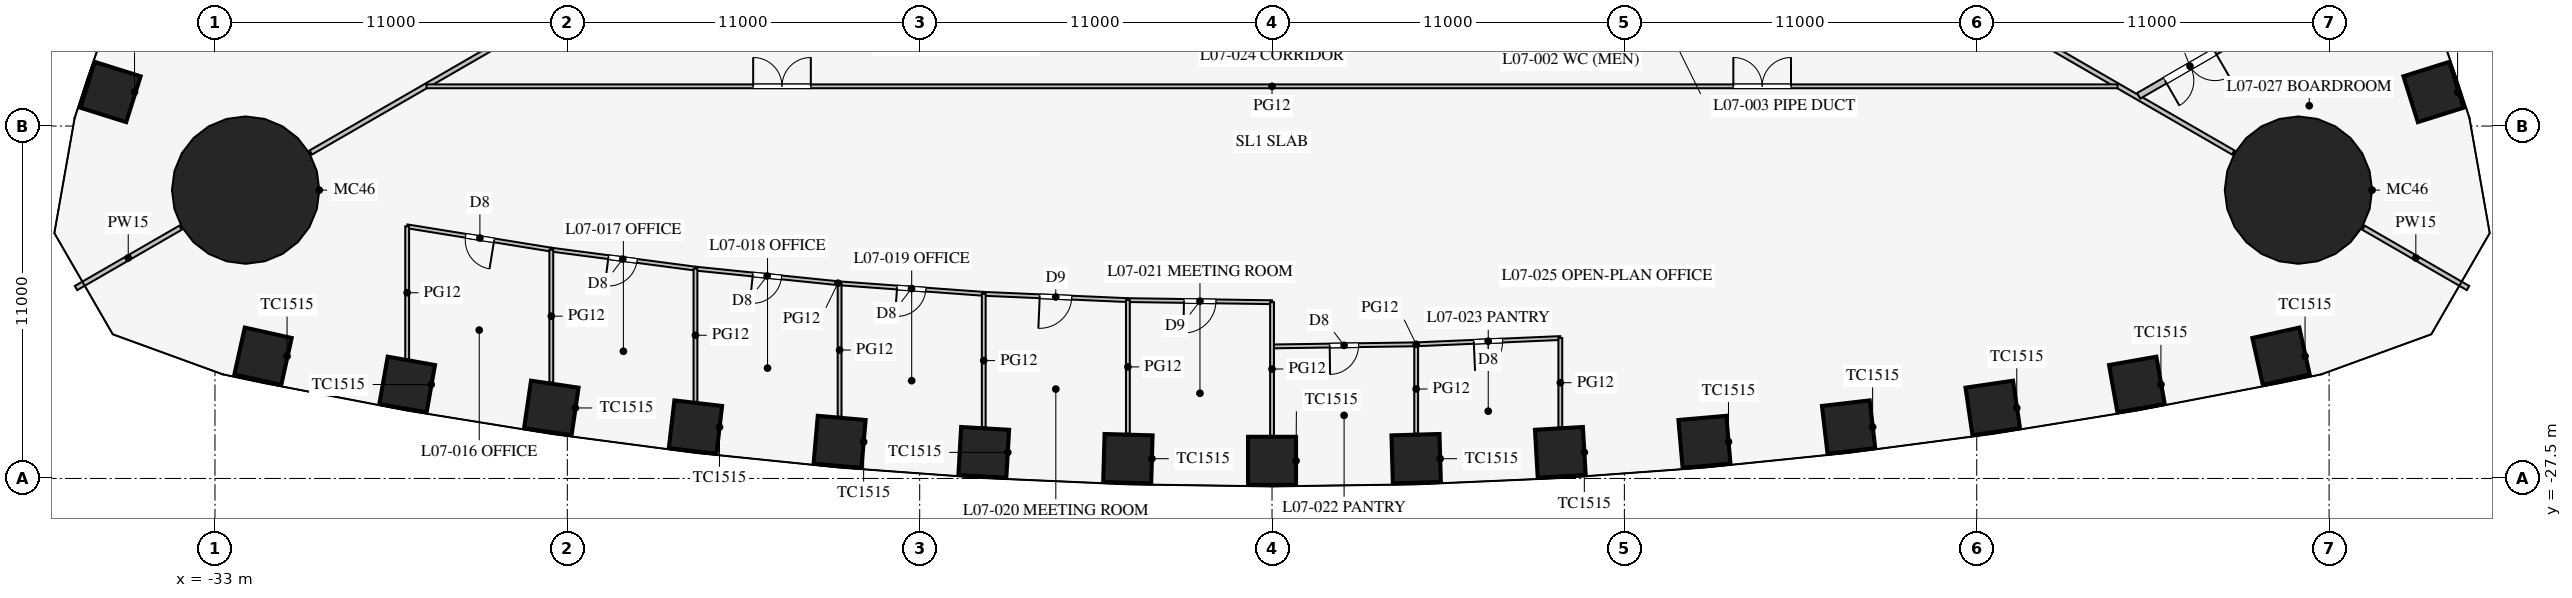
"""IFC4 building model, lengths in metres.
Left out: names, types, materials, properties, quantities, classifications, styles, units other than length and angle.
Written with IfcOpenShell. Run it as: python <this file> out.ifc"""

import sys

from ifc_helpers import new_model, si_unit, direction, frame, frame_2d, origin, origin_2d, place, context, subcontext, project, spatial, rectangle, circle, extrude, element, fill, save


model = new_model("IFC4")
c1 = context("Model", 3, precision=1e-05, world=origin(), true_north=direction((0.0, 1.0)))
c2 = subcontext(c1, "Body", "Model", "MODEL_VIEW")
j1 = project(units=[si_unit("LENGTHUNIT", "METRE"), si_unit("PLANEANGLEUNIT", "RADIAN")], contexts=[c1])
p1 = place(None, origin())
s1 = spatial("IfcSite", under=j1, at=p1, CompositionType="ELEMENT")
p2 = place(p1, origin())
s2 = spatial("IfcBuilding", under=s1, at=p2, CompositionType="ELEMENT")
p3 = place(p2, frame((0.0, 0.0, 33.3)))
s3 = spatial("IfcBuildingStorey", under=s2, at=p3, CompositionType="ELEMENT", Elevation=33.3)
for number, where, z_axis, x_axis in (
    (1, (-31.5, -23.685, 0.0), (0.0, 0.0, 1.0), (0.976, -0.217, 0.0)),
    (2, (-27.0, -24.568, 0.0), (0.0, 0.0, 1.0), (0.985, -0.174, 0.0)),
    (3, (-22.5, -25.299, 0.0), (0.0, 0.0, 1.0), (0.989, -0.145, 0.0)),
    (4, (-18.0, -25.895, 0.0), (0.0, 0.0, 1.0), (0.993, -0.116, 0.0)),
    (5, (-13.5, -26.357, 0.0), (0.0, 0.0, 1.0), (0.996, -0.087, 0.0)),
    (6, (-9.0, -26.686, 0.0), (0.0, 0.0, 1.0), (0.998, -0.058, 0.0)),
    (7, (-4.5, -26.883, 0.0), (0.0, 0.0, 1.0), (1.0, -0.029, 0.0)),
    (8, (0.0, -26.949, 0.0), (0.0, 0.0, 1.0), (1.0, 0.0, 0.0)),
    (9, (4.5, -26.883, 0.0), (0.0, 0.0, 1.0), (1.0, 0.029, 0.0)),
    (10, (9.0, -26.686, 0.0), (0.0, 0.0, 1.0), (0.998, 0.058, 0.0)),
    (11, (13.5, -26.357, 0.0), (0.0, 0.0, 1.0), (0.996, 0.087, 0.0)),
    (12, (18.0, -25.895, 0.0), (0.0, 0.0, 1.0), (0.993, 0.116, 0.0)),
    (13, (22.5, -25.299, 0.0), (0.0, 0.0, 1.0), (0.989, 0.145, 0.0)),
    (14, (27.0, -24.568, 0.0), (0.0, 0.0, 1.0), (0.985, 0.174, 0.0)),
    (15, (31.5, -23.685, 0.0), (0.0, 0.0, 1.0), (0.976, 0.217, 0.0)),
    (16, (36.262, -15.438, 0.0), (0.0, 0.0, 1.0), (-0.3, 0.954, 0.0)),
    (17, (-36.262, -15.438, 0.0), (0.0, 0.0, 1.0), (-0.3, -0.954, 0.0)),
):
    element("IfcColumn", number, at=place(p3, frame(where, z_axis=z_axis, x_axis=x_axis)), inside=s3, PredefinedType="COLUMN", context=c2, shape_type="SweptSolid", body=[
        extrude(rectangle(XDim=1.5, YDim=1.5, at=origin_2d()), origin(), (0.0, 0.0, 1.0), 4.2),
    ])
for number, where, z_axis, x_axis in (
    (18, (32.043, -18.5, 0.0), (0.0, 0.0, 1.0), (1.0, 0.0, 0.0)),
    (19, (-32.043, -18.5, 0.0), (0.0, 0.0, 1.0), (1.0, 0.0, 0.0)),
):
    element("IfcColumn", number, at=place(p3, frame(where, z_axis=z_axis, x_axis=x_axis)), inside=s3, PredefinedType="COLUMN", context=c2, shape_type="SweptSolid", body=[
        extrude(circle(Radius=2.3, at=origin_2d()), origin(), (0.0, 0.0, 1.0), 4.2),
    ])
p4 = place(p3, frame((14.203, -8.2, 0.0), z_axis=(0.0, 0.0, 1.0), x_axis=(0.866024965723, -0.500000758745, 0.0)))
e20 = element("IfcWall", 20, at=p4, inside=s3, PredefinedType="PARTITIONING", context=c2, shape_type="SweptSolid", body=[
    extrude(rectangle(XDim=18.25, YDim=0.15, at=frame_2d((9.125, 0.0))), origin(), (0.0, 0.0, 1.0), 2.3),
])
p5 = place(p3, frame((34.078, -19.675, 0.0), z_axis=(0.0, 0.0, 1.0), x_axis=(0.866019247219, -0.500010663332, 0.0)))
e21 = element("IfcWall", 21, at=p5, inside=s3, PredefinedType="PARTITIONING", context=c2, shape_type="SweptSolid", body=[
    extrude(rectangle(XDim=3.764, YDim=0.15, at=frame_2d((1.882, 0.0))), origin(), (0.0, 0.0, 1.0), 2.3),
])
p6 = place(p3, frame((-14.203, -8.2, 0.0), z_axis=(0.0, 0.0, 1.0), x_axis=(-0.866024965723, -0.500000758745, 0.0)))
e22 = element("IfcWall", 22, at=p6, inside=s3, PredefinedType="PARTITIONING", context=c2, shape_type="SweptSolid", body=[
    extrude(rectangle(XDim=18.25, YDim=0.15, at=frame_2d((9.125, 0.0))), origin(), (0.0, 0.0, 1.0), 2.3),
])
p7 = place(p3, frame((-34.078, -19.675, 0.0), z_axis=(0.0, 0.0, 1.0), x_axis=(-0.866019247219, -0.500010663332, 0.0)))
e23 = element("IfcWall", 23, at=p7, inside=s3, PredefinedType="PARTITIONING", context=c2, shape_type="SweptSolid", body=[
    extrude(rectangle(XDim=3.764, YDim=0.15, at=frame_2d((1.882, 0.0))), origin(), (0.0, 0.0, 1.0), 2.3),
])
p8 = place(p3, frame((-26.398, -15.26, 0.0), z_axis=(0.0, 0.0, 1.0), x_axis=(1.0, 0.0, 0.0)))
e24 = element("IfcWall", 24, at=p8, inside=s3, PredefinedType="PARTITIONING", context=c2, shape_type="SweptSolid", body=[
    extrude(rectangle(XDim=52.796, YDim=0.12, at=frame_2d((26.398, 0.0))), origin(), (0.0, 0.0, 1.0), 2.9),
])
p9 = place(p8, frame((10.2, 0.0, 0.15)))
e25 = element("IfcOpeningElement", 25, at=p9, cuts=e24, PredefinedType="OPENING", context=c2, shape_type="SweptSolid", body=[
    extrude(rectangle(XDim=1.8, YDim=2.1, at=frame_2d((0.9, 1.05))), frame((0.0, 0.07, 0.0), z_axis=(0.0, -1.0, 0.0), x_axis=(1.0, 0.0, 0.0)), (0.0, 0.0, 1.0), 0.14),
])
p10 = place(p8, frame((40.8, 0.0, 0.15)))
e26 = element("IfcOpeningElement", 26, at=p10, cuts=e24, PredefinedType="OPENING", context=c2, shape_type="SweptSolid", body=[
    extrude(rectangle(XDim=1.8, YDim=2.1, at=frame_2d((0.9, 1.05))), frame((0.0, 0.07, 0.0), z_axis=(0.0, -1.0, 0.0), x_axis=(1.0, 0.0, 0.0)), (0.0, 0.0, 1.0), 0.14),
])
p11 = place(p3, frame((0.0, -23.379, 0.0), z_axis=(0.0, 0.0, 1.0), x_axis=(0.999895099088, 0.014484157523, 0.0)))
e27 = element("IfcWall", 27, at=p11, inside=s3, PredefinedType="PARTITIONING", context=c2, shape_type="SweptSolid", body=[
    extrude(rectangle(XDim=4.5, YDim=0.12, at=frame_2d((2.25, 0.0))), origin(), (0.0, 0.0, 1.0), 2.9),
])
p12 = place(p11, frame((1.8, 0.0, 0.15)))
e28 = element("IfcOpeningElement", 28, at=p12, cuts=e27, PredefinedType="OPENING", context=c2, shape_type="SweptSolid", body=[
    extrude(rectangle(XDim=0.9, YDim=2.1, at=frame_2d((0.45, 1.05))), frame((0.0, 0.07, 0.0), z_axis=(0.0, -1.0, 0.0), x_axis=(1.0, 0.0, 0.0)), (0.0, 0.0, 1.0), 0.14),
])
p13 = place(p3, frame((4.5, -23.313, 0.0), z_axis=(0.0, 0.0, 1.0), x_axis=(0.999052370647, 0.043524254212, 0.0)))
e29 = element("IfcWall", 29, at=p13, inside=s3, PredefinedType="PARTITIONING", context=c2, shape_type="SweptSolid", body=[
    extrude(rectangle(XDim=4.504, YDim=0.12, at=frame_2d((2.252, 0.0))), origin(), (0.0, 0.0, 1.0), 2.9),
])
p14 = place(p13, frame((1.8, 0.0, 0.15)))
e30 = element("IfcOpeningElement", 30, at=p14, cuts=e29, PredefinedType="OPENING", context=c2, shape_type="SweptSolid", body=[
    extrude(rectangle(XDim=0.9, YDim=2.1, at=frame_2d((0.45, 1.05))), frame((0.0, 0.07, 0.0), z_axis=(0.0, -1.0, 0.0), x_axis=(1.0, 0.0, 0.0)), (0.0, 0.0, 1.0), 0.14),
])
p15 = place(p3, frame((-13.5, -21.41, 0.0), z_axis=(0.0, 0.0, 1.0), x_axis=(0.997363894896, -0.072562119306, 0.0)))
e31 = element("IfcWall", 31, at=p15, inside=s3, PredefinedType="PARTITIONING", context=c2, shape_type="SweptSolid", body=[
    extrude(rectangle(XDim=4.512, YDim=0.12, at=frame_2d((2.256, 0.0))), origin(), (0.0, 0.0, 1.0), 2.9),
])
p16 = place(p15, frame((1.8, 0.0, 0.15)))
e32 = element("IfcOpeningElement", 32, at=p16, cuts=e31, PredefinedType="OPENING", context=c2, shape_type="SweptSolid", body=[
    extrude(rectangle(XDim=0.9, YDim=2.1, at=frame_2d((0.45, 1.05))), frame((0.0, 0.07, 0.0), z_axis=(0.0, -1.0, 0.0), x_axis=(1.0, 0.0, 0.0)), (0.0, 0.0, 1.0), 0.14),
])
p17 = place(p3, frame((-18.0, -20.951, 0.0), z_axis=(0.0, 0.0, 1.0), x_axis=(0.994833141332, -0.101523499286, 0.0)))
e33 = element("IfcWall", 33, at=p17, inside=s3, PredefinedType="PARTITIONING", context=c2, shape_type="SweptSolid", body=[
    extrude(rectangle(XDim=4.523, YDim=0.12, at=frame_2d((2.262, 0.0))), origin(), (0.0, 0.0, 1.0), 2.9),
])
p18 = place(p17, frame((1.8, 0.0, 0.15)))
e34 = element("IfcOpeningElement", 34, at=p18, cuts=e33, PredefinedType="OPENING", context=c2, shape_type="SweptSolid", body=[
    extrude(rectangle(XDim=0.9, YDim=2.1, at=frame_2d((0.45, 1.05))), frame((0.0, 0.07, 0.0), z_axis=(0.0, -1.0, 0.0), x_axis=(1.0, 0.0, 0.0)), (0.0, 0.0, 1.0), 0.14),
])
p19 = place(p3, frame((-22.5, -20.358, 0.0), z_axis=(0.0, 0.0, 1.0), x_axis=(0.991435244698, -0.130599217346, 0.0)))
e35 = element("IfcWall", 35, at=p19, inside=s3, PredefinedType="PARTITIONING", context=c2, shape_type="SweptSolid", body=[
    extrude(rectangle(XDim=4.539, YDim=0.12, at=frame_2d((2.27, 0.0))), origin(), (0.0, 0.0, 1.0), 2.9),
])
p20 = place(p19, frame((1.8, 0.0, 0.15)))
e36 = element("IfcOpeningElement", 36, at=p20, cuts=e35, PredefinedType="OPENING", context=c2, shape_type="SweptSolid", body=[
    extrude(rectangle(XDim=0.9, YDim=2.1, at=frame_2d((0.45, 1.05))), frame((0.0, 0.07, 0.0), z_axis=(0.0, -1.0, 0.0), x_axis=(1.0, 0.0, 0.0)), (0.0, 0.0, 1.0), 0.14),
])
p21 = place(p3, frame((-27.0, -19.63, 0.0), z_axis=(0.0, 0.0, 1.0), x_axis=(0.987181300889, -0.159602879593, 0.0)))
e37 = element("IfcWall", 37, at=p21, inside=s3, PredefinedType="PARTITIONING", context=c2, shape_type="SweptSolid", body=[
    extrude(rectangle(XDim=4.558, YDim=0.12, at=frame_2d((2.279, 0.0))), origin(), (0.0, 0.0, 1.0), 2.9),
])
p22 = place(p21, frame((1.85, 0.0, 0.15)))
e38 = element("IfcOpeningElement", 38, at=p22, cuts=e37, PredefinedType="OPENING", context=c2, shape_type="SweptSolid", body=[
    extrude(rectangle(XDim=0.9, YDim=2.1, at=frame_2d((0.45, 1.05))), frame((0.0, 0.07, 0.0), z_axis=(0.0, -1.0, 0.0), x_axis=(1.0, 0.0, 0.0)), (0.0, 0.0, 1.0), 0.14),
])
p23 = place(p3, frame((-4.5, -21.933, 0.0), z_axis=(0.0, 0.0, 1.0), x_axis=(0.999894311967, -0.014538393859, 0.0)))
e39 = element("IfcWall", 39, at=p23, inside=s3, PredefinedType="PARTITIONING", context=c2, shape_type="SweptSolid", body=[
    extrude(rectangle(XDim=4.5, YDim=0.12, at=frame_2d((2.25, 0.0))), origin(), (0.0, 0.0, 1.0), 2.9),
])
p24 = place(p23, frame((1.75, 0.0, 0.15)))
e40 = element("IfcOpeningElement", 40, at=p24, cuts=e39, PredefinedType="OPENING", context=c2, shape_type="SweptSolid", body=[
    extrude(rectangle(XDim=1.0, YDim=2.1, at=frame_2d((0.5, 1.05))), frame((0.0, 0.07, 0.0), z_axis=(0.0, -1.0, 0.0), x_axis=(1.0, 0.0, 0.0)), (0.0, 0.0, 1.0), 0.14),
])
p25 = place(p3, frame((-9.0, -21.737, 0.0), z_axis=(0.0, 0.0, 1.0), x_axis=(0.999052370647, -0.043524254212, 0.0)))
e41 = element("IfcWall", 41, at=p25, inside=s3, PredefinedType="PARTITIONING", context=c2, shape_type="SweptSolid", body=[
    extrude(rectangle(XDim=4.504, YDim=0.12, at=frame_2d((2.252, 0.0))), origin(), (0.0, 0.0, 1.0), 2.9),
])
p26 = place(p25, frame((1.75, 0.0, 0.15)))
e42 = element("IfcOpeningElement", 42, at=p26, cuts=e41, PredefinedType="OPENING", context=c2, shape_type="SweptSolid", body=[
    extrude(rectangle(XDim=1.0, YDim=2.1, at=frame_2d((0.5, 1.05))), frame((0.0, 0.07, 0.0), z_axis=(0.0, -1.0, 0.0), x_axis=(1.0, 0.0, 0.0)), (0.0, 0.0, 1.0), 0.14),
])
p27 = place(p3, frame((0.0, -21.999, 0.0), z_axis=(0.0, 0.0, 1.0), x_axis=(0.0, -1.0, 0.0)))
e43 = element("IfcWall", 43, at=p27, inside=s3, PredefinedType="PARTITIONING", context=c2, shape_type="SweptSolid", body=[
    extrude(rectangle(XDim=4.17, YDim=0.12, at=frame_2d((2.085, 0.0))), origin(), (0.0, 0.0, 1.0), 2.9),
])
p28 = place(p3, frame((4.5, -23.313, 0.0), z_axis=(0.0, 0.0, 1.0), x_axis=(0.0, -1.0, 0.0)))
e44 = element("IfcWall", 44, at=p28, inside=s3, PredefinedType="PARTITIONING", context=c2, shape_type="SweptSolid", body=[
    extrude(rectangle(XDim=2.789, YDim=0.12, at=frame_2d((1.395, 0.0))), origin(), (0.0, 0.0, 1.0), 2.9),
])
p29 = place(p3, frame((9.0, -23.117, 0.0), z_axis=(0.0, 0.0, 1.0), x_axis=(0.0, -1.0, 0.0)))
e45 = element("IfcWall", 45, at=p29, inside=s3, PredefinedType="PARTITIONING", context=c2, shape_type="SweptSolid", body=[
    extrude(rectangle(XDim=2.787, YDim=0.12, at=frame_2d((1.394, 0.0))), origin(), (0.0, 0.0, 1.0), 2.9),
])
p30 = place(p3, frame((-13.5, -21.41, 0.0), z_axis=(0.0, 0.0, 1.0), x_axis=(0.0, -1.0, 0.0)))
e46 = element("IfcWall", 46, at=p30, inside=s3, PredefinedType="PARTITIONING", context=c2, shape_type="SweptSolid", body=[
    extrude(rectangle(XDim=4.164, YDim=0.12, at=frame_2d((2.082, 0.0))), origin(), (0.0, 0.0, 1.0), 2.9),
])
p31 = place(p3, frame((-18.0, -20.951, 0.0), z_axis=(0.0, 0.0, 1.0), x_axis=(0.0, -1.0, 0.0)))
e47 = element("IfcWall", 47, at=p31, inside=s3, PredefinedType="PARTITIONING", context=c2, shape_type="SweptSolid", body=[
    extrude(rectangle(XDim=4.159, YDim=0.12, at=frame_2d((2.08, 0.0))), origin(), (0.0, 0.0, 1.0), 2.9),
])
p32 = place(p3, frame((-22.5, -20.358, 0.0), z_axis=(0.0, 0.0, 1.0), x_axis=(0.0, -1.0, 0.0)))
e48 = element("IfcWall", 48, at=p32, inside=s3, PredefinedType="PARTITIONING", context=c2, shape_type="SweptSolid", body=[
    extrude(rectangle(XDim=4.153, YDim=0.12, at=frame_2d((2.077, 0.0))), origin(), (0.0, 0.0, 1.0), 2.9),
])
p33 = place(p3, frame((-27.0, -19.63, 0.0), z_axis=(0.0, 0.0, 1.0), x_axis=(0.0, -1.0, 0.0)))
e49 = element("IfcWall", 49, at=p33, inside=s3, PredefinedType="PARTITIONING", context=c2, shape_type="SweptSolid", body=[
    extrude(rectangle(XDim=4.146, YDim=0.12, at=frame_2d((2.073, 0.0))), origin(), (0.0, 0.0, 1.0), 2.9),
])
p34 = place(p3, frame((-4.5, -21.933, 0.0), z_axis=(0.0, 0.0, 1.0), x_axis=(0.0, -1.0, 0.0)))
e50 = element("IfcWall", 50, at=p34, inside=s3, PredefinedType="PARTITIONING", context=c2, shape_type="SweptSolid", body=[
    extrude(rectangle(XDim=4.169, YDim=0.12, at=frame_2d((2.085, 0.0))), origin(), (0.0, 0.0, 1.0), 2.9),
])
p35 = place(p3, frame((-9.0, -21.737, 0.0), z_axis=(0.0, 0.0, 1.0), x_axis=(0.0, -1.0, 0.0)))
e51 = element("IfcWall", 51, at=p35, inside=s3, PredefinedType="PARTITIONING", context=c2, shape_type="SweptSolid", body=[
    extrude(rectangle(XDim=4.167, YDim=0.12, at=frame_2d((2.084, 0.0))), origin(), (0.0, 0.0, 1.0), 2.9),
])
p36 = place(p3, frame((27.055, -15.557, 0.0), z_axis=(0.0, 0.0, 1.0), x_axis=(0.866026445548, 0.499998195608, 0.0)))
e52 = element("IfcWall", 52, at=p36, inside=s3, PredefinedType="PARTITIONING", context=c2, shape_type="SweptSolid", body=[
    extrude(rectangle(XDim=8.124, YDim=0.2, at=frame_2d((4.062, 0.0))), origin(), (0.0, 0.0, 1.0), 2.9),
])
p37 = place(p36, frame((0.95, 0.0, 0.15)))
e53 = element("IfcOpeningElement", 53, at=p37, cuts=e52, PredefinedType="OPENING", context=c2, shape_type="SweptSolid", body=[
    extrude(rectangle(XDim=1.8, YDim=2.1, at=frame_2d((0.9, 1.05))), frame((0.0, 0.11, 0.0), z_axis=(0.0, -1.0, 0.0), x_axis=(1.0, 0.0, 0.0)), (0.0, 0.0, 1.0), 0.22),
])
p38 = place(p22, frame((0.9, 0.0, 0.0), z_axis=(0.0, 0.0, 1.0), x_axis=(-1.0, 0.0, 0.0)))
e54 = element("IfcDoor", 54, at=p38, inside=s3, OperationType="SINGLE_SWING_LEFT", PredefinedType="DOOR", context=c2, shape_type="SweptSolid", body=[
    extrude(rectangle(XDim=0.9, YDim=2.1, at=frame_2d((0.45, 1.05))), frame((0.0, 0.025, 0.0), z_axis=(0.0, -1.0, 0.0), x_axis=(1.0, 0.0, 0.0)), (0.0, 0.0, 1.0), 0.05),
])
fill(e38, e54)
p39 = place(p20, frame((0.9, 0.0, 0.0), z_axis=(0.0, 0.0, 1.0), x_axis=(-1.0, 0.0, 0.0)))
e55 = element("IfcDoor", 55, at=p39, inside=s3, OperationType="SINGLE_SWING_RIGHT", PredefinedType="DOOR", context=c2, shape_type="SweptSolid", body=[
    extrude(rectangle(XDim=0.9, YDim=2.1, at=frame_2d((0.45, 1.05))), frame((0.0, 0.025, 0.0), z_axis=(0.0, -1.0, 0.0), x_axis=(1.0, 0.0, 0.0)), (0.0, 0.0, 1.0), 0.05),
])
fill(e36, e55)
p40 = place(p18, frame((0.9, 0.0, 0.0), z_axis=(0.0, 0.0, 1.0), x_axis=(-1.0, 0.0, 0.0)))
e56 = element("IfcDoor", 56, at=p40, inside=s3, OperationType="SINGLE_SWING_RIGHT", PredefinedType="DOOR", context=c2, shape_type="SweptSolid", body=[
    extrude(rectangle(XDim=0.9, YDim=2.1, at=frame_2d((0.45, 1.05))), frame((0.0, 0.025, 0.0), z_axis=(0.0, -1.0, 0.0), x_axis=(1.0, 0.0, 0.0)), (0.0, 0.0, 1.0), 0.05),
])
fill(e34, e56)
p41 = place(p16, frame((0.9, 0.0, 0.0), z_axis=(0.0, 0.0, 1.0), x_axis=(-1.0, 0.0, 0.0)))
e57 = element("IfcDoor", 57, at=p41, inside=s3, OperationType="SINGLE_SWING_RIGHT", PredefinedType="DOOR", context=c2, shape_type="SweptSolid", body=[
    extrude(rectangle(XDim=0.9, YDim=2.1, at=frame_2d((0.45, 1.05))), frame((0.0, 0.025, 0.0), z_axis=(0.0, -1.0, 0.0), x_axis=(1.0, 0.0, 0.0)), (0.0, 0.0, 1.0), 0.05),
])
fill(e32, e57)
p42 = place(p26, frame((1.0, 0.0, 0.0), z_axis=(0.0, 0.0, 1.0), x_axis=(-1.0, 0.0, 0.0)))
e58 = element("IfcDoor", 58, at=p42, inside=s3, OperationType="SINGLE_SWING_RIGHT", PredefinedType="DOOR", context=c2, shape_type="SweptSolid", body=[
    extrude(rectangle(XDim=1.0, YDim=2.1, at=frame_2d((0.5, 1.05))), frame((0.0, 0.025, 0.0), z_axis=(0.0, -1.0, 0.0), x_axis=(1.0, 0.0, 0.0)), (0.0, 0.0, 1.0), 0.05),
])
fill(e42, e58)
p43 = place(p24, frame((1.0, 0.0, 0.0), z_axis=(0.0, 0.0, 1.0), x_axis=(-1.0, 0.0, 0.0)))
e59 = element("IfcDoor", 59, at=p43, inside=s3, OperationType="SINGLE_SWING_RIGHT", PredefinedType="DOOR", context=c2, shape_type="SweptSolid", body=[
    extrude(rectangle(XDim=1.0, YDim=2.1, at=frame_2d((0.5, 1.05))), frame((0.0, 0.025, 0.0), z_axis=(0.0, -1.0, 0.0), x_axis=(1.0, 0.0, 0.0)), (0.0, 0.0, 1.0), 0.05),
])
fill(e40, e59)
p44 = place(p12, frame((0.9, 0.0, 0.0), z_axis=(0.0, 0.0, 1.0), x_axis=(-1.0, 0.0, 0.0)))
e60 = element("IfcDoor", 60, at=p44, inside=s3, OperationType="SINGLE_SWING_RIGHT", PredefinedType="DOOR", context=c2, shape_type="SweptSolid", body=[
    extrude(rectangle(XDim=0.9, YDim=2.1, at=frame_2d((0.45, 1.05))), frame((0.0, 0.025, 0.0), z_axis=(0.0, -1.0, 0.0), x_axis=(1.0, 0.0, 0.0)), (0.0, 0.0, 1.0), 0.05),
])
fill(e28, e60)
p45 = place(p14, frame((0.9, 0.0, 0.0), z_axis=(0.0, 0.0, 1.0), x_axis=(-1.0, 0.0, 0.0)))
e61 = element("IfcDoor", 61, at=p45, inside=s3, OperationType="SINGLE_SWING_RIGHT", PredefinedType="DOOR", context=c2, shape_type="SweptSolid", body=[
    extrude(rectangle(XDim=0.9, YDim=2.1, at=frame_2d((0.45, 1.05))), frame((0.0, 0.025, 0.0), z_axis=(0.0, -1.0, 0.0), x_axis=(1.0, 0.0, 0.0)), (0.0, 0.0, 1.0), 0.05),
])
fill(e30, e61)
p46 = place(p9, origin())
e62 = element("IfcDoor", 62, at=p46, inside=s3, OperationType="DOUBLE_DOOR_SINGLE_SWING", PredefinedType="DOOR", context=c2, shape_type="SweptSolid", body=[
    extrude(rectangle(XDim=1.8, YDim=2.1, at=frame_2d((0.9, 1.05))), frame((0.0, 0.025, 0.0), z_axis=(0.0, -1.0, 0.0), x_axis=(1.0, 0.0, 0.0)), (0.0, 0.0, 1.0), 0.05),
])
fill(e25, e62)
p47 = place(p10, origin())
e63 = element("IfcDoor", 63, at=p47, inside=s3, OperationType="DOUBLE_DOOR_SINGLE_SWING", PredefinedType="DOOR", context=c2, shape_type="SweptSolid", body=[
    extrude(rectangle(XDim=1.8, YDim=2.1, at=frame_2d((0.9, 1.05))), frame((0.0, 0.025, 0.0), z_axis=(0.0, -1.0, 0.0), x_axis=(1.0, 0.0, 0.0)), (0.0, 0.0, 1.0), 0.05),
])
fill(e26, e63)
p48 = place(p37, frame((1.8, 0.0, 0.0), z_axis=(0.0, 0.0, 1.0), x_axis=(-1.0, 0.0, 0.0)))
e64 = element("IfcDoor", 64, at=p48, inside=s3, OperationType="DOUBLE_DOOR_SINGLE_SWING", PredefinedType="DOOR", context=c2, shape_type="SweptSolid", body=[
    extrude(rectangle(XDim=1.8, YDim=2.1, at=frame_2d((0.9, 1.05))), frame((0.0, 0.025, 0.0), z_axis=(0.0, -1.0, 0.0), x_axis=(1.0, 0.0, 0.0)), (0.0, 0.0, 1.0), 0.05),
])
fill(e53, e64)
save(model, sys.argv[1])
